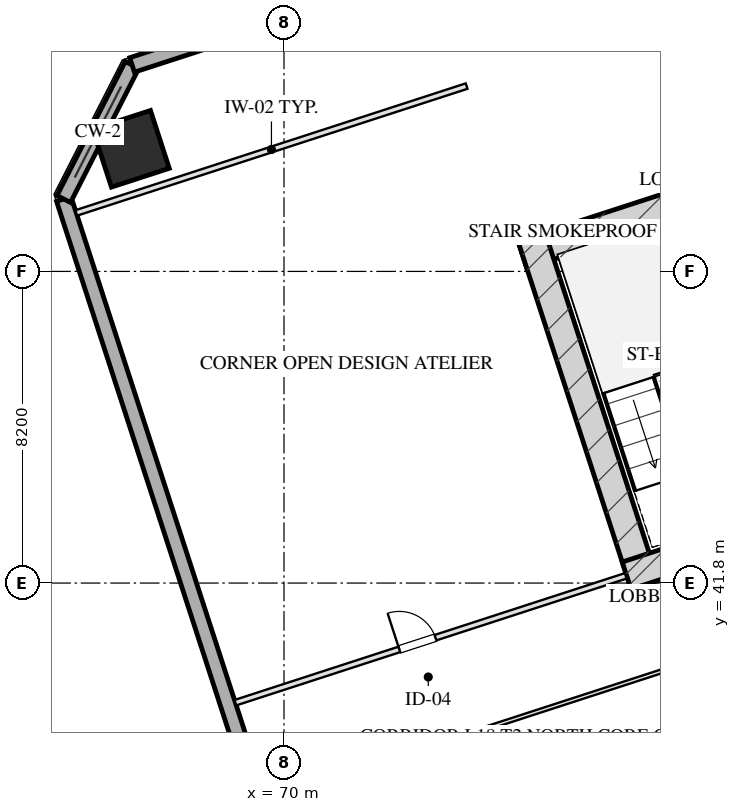
"""IFC4 building model, lengths in metres.
Left out: names, types, materials, properties, quantities, classifications, styles, units other than length and angle.
Written with IfcOpenShell. Run it as: python <this file> out.ifc"""

import sys

from ifc_helpers import new_model, si_unit, direction, frame, frame_2d, origin, origin_2d, place, context, subcontext, project, spatial, rectangle, hollow_rectangle, extrude, element, fill, save


model = new_model("IFC4")
c1 = context("Model", 3, precision=1e-05, world=origin(), true_north=direction((0.0, 1.0)))
c2 = subcontext(c1, "Body", "Model", "MODEL_VIEW")
j1 = project(units=[si_unit("LENGTHUNIT", "METRE"), si_unit("PLANEANGLEUNIT", "RADIAN")], contexts=[c1])
p1 = place(None, origin())
s1 = spatial("IfcSite", under=j1, at=p1, CompositionType="ELEMENT")
p2 = place(p1, origin())
s2 = spatial("IfcBuilding", under=s1, at=p2, CompositionType="ELEMENT")
p3 = place(p2, frame((0.0, 0.0, 74.75)))
s3 = spatial("IfcBuildingStorey", under=s2, at=p3, CompositionType="ELEMENT", Elevation=74.75)
p4 = place(p3, frame((76.272, 50.443, 0.0), z_axis=(0.0, 0.0, 1.0), x_axis=(0.951056072937, 0.309018358888, 0.0)))
e1 = element("IfcWall", 1, at=p4, inside=s3, PredefinedType="SHEAR", context=c2, shape_type="SweptSolid", body=[
    extrude(rectangle(XDim=16.55, YDim=0.75, at=frame_2d((8.275, 0.0))), origin(), (0.0, 0.0, 1.0), 3.45),
])
p5 = place(p3, frame((79.489, 41.756, 0.0), z_axis=(0.0, 0.0, 1.0), x_axis=(-0.309016134813, 0.951056795583, 0.0)))
e2 = element("IfcWall", 2, at=p5, inside=s3, PredefinedType="SHEAR", context=c2, shape_type="SweptSolid", body=[
    extrude(rectangle(XDim=9.63, YDim=0.75, at=frame_2d((4.815, 0.0))), origin(), (0.0, 0.0, 1.0), 3.45),
])
p6 = place(p3, frame((79.016, 41.997, 0.0), z_axis=(0.0, 0.0, 1.0), x_axis=(0.95106038264, 0.309005094736, 0.0)))
e3 = element("IfcWall", 3, at=p6, inside=s3, PredefinedType="SHEAR", context=c2, shape_type="SweptSolid", body=[
    extrude(rectangle(XDim=4.295, YDim=0.75, at=frame_2d((2.147, 0.0))), origin(), (0.0, 0.0, 1.0), 3.45),
])
p7 = place(p3, frame((65.973, 53.226, 0.0), z_axis=(0.0, 0.0, 1.0), x_axis=(0.951056516295, 0.309016994375, 0.0)))
e4 = element("IfcColumn", 4, at=p7, inside=s3, PredefinedType="COLUMN", context=c2, shape_type="SweptSolid", body=[
    extrude(hollow_rectangle(XDim=1.6, YDim=1.6, WallThickness=0.055, at=origin_2d()), origin(), (0.0, 0.0, 1.0), 3.451),
])
p8 = place(p3, frame((79.655, 4.352, 0.0), z_axis=(0.0, 0.0, 1.0), x_axis=(-0.309014526607, 0.951057318118, 0.0)))
e5 = element("IfcWall", 5, at=p8, inside=s3, PredefinedType="SOLIDWALL", context=c2, shape_type="SweptSolid", body=[
    extrude(rectangle(XDim=50.0, YDim=0.4, at=frame_2d((25.0, 0.0))), origin(), (0.0, 0.0, 1.0), 2.61),
])
p9 = place(p8, frame((17.35, 0.0, 0.75)))
e6 = element("IfcOpeningElement", 6, at=p9, cuts=e5, PredefinedType="OPENING", context=c2, shape_type="SweptSolid", body=[
    extrude(rectangle(XDim=2.5, YDim=1.46, at=frame_2d((1.25, 0.73))), frame((0.0, 0.21, 0.0), z_axis=(0.0, -1.0, 0.0), x_axis=(1.0, 0.0, 0.0)), (0.0, 0.0, 1.0), 0.42),
])
p10 = place(p8, frame((21.15, 0.0, 0.75)))
e7 = element("IfcOpeningElement", 7, at=p10, cuts=e5, PredefinedType="OPENING", context=c2, shape_type="SweptSolid", body=[
    extrude(rectangle(XDim=2.5, YDim=1.46, at=frame_2d((1.25, 0.73))), frame((0.0, 0.21, 0.0), z_axis=(0.0, -1.0, 0.0), x_axis=(1.0, 0.0, 0.0)), (0.0, 0.0, 1.0), 0.42),
])
p11 = place(p8, frame((26.35, 0.0, 0.75)))
e8 = element("IfcOpeningElement", 8, at=p11, cuts=e5, PredefinedType="OPENING", context=c2, shape_type="SweptSolid", body=[
    extrude(rectangle(XDim=2.5, YDim=1.46, at=frame_2d((1.25, 0.73))), frame((0.0, 0.21, 0.0), z_axis=(0.0, -1.0, 0.0), x_axis=(1.0, 0.0, 0.0)), (0.0, 0.0, 1.0), 0.42),
])
p12 = place(p8, frame((30.15, 0.0, 0.75)))
e9 = element("IfcOpeningElement", 9, at=p12, cuts=e5, PredefinedType="OPENING", context=c2, shape_type="SweptSolid", body=[
    extrude(rectangle(XDim=2.5, YDim=1.46, at=frame_2d((1.25, 0.73))), frame((0.0, 0.21, 0.0), z_axis=(0.0, -1.0, 0.0), x_axis=(1.0, 0.0, 0.0)), (0.0, 0.0, 1.0), 0.42),
])
p13 = place(p3, frame((64.205, 51.905, 0.0), z_axis=(0.0, 0.0, 1.0), x_axis=(0.453958106755, 0.891023028497, 0.0)))
e10 = element("IfcWall", 10, at=p13, inside=s3, PredefinedType="SOLIDWALL", context=c2, shape_type="SweptSolid", body=[
    extrude(rectangle(XDim=3.96, YDim=0.4, at=frame_2d((1.98, 0.0))), origin(), (0.0, 0.0, 1.0), 2.61),
])
p14 = place(p3, frame((66.002, 55.433, 0.0), z_axis=(0.0, 0.0, 1.0), x_axis=(0.951055939317, 0.309018770125, 0.0)))
e11 = element("IfcWall", 11, at=p14, inside=s3, PredefinedType="SOLIDWALL", context=c2, shape_type="SweptSolid", body=[
    extrude(rectangle(XDim=32.4, YDim=0.4, at=frame_2d((16.2, 0.0))), origin(), (0.0, 0.0, 1.0), 2.61),
])
p15 = place(p3, frame((64.534, 51.539, 0.0), z_axis=(0.0, 0.0, 1.0), x_axis=(0.951056658866, 0.309016555588, 0.0)))
e12 = element("IfcWall", 12, at=p15, inside=s3, PredefinedType="PARTITIONING", context=c2, shape_type="SweptSolid", body=[
    extrude(rectangle(XDim=10.8, YDim=0.15, at=frame_2d((5.4, 0.0))), origin(), (0.0, 0.0, 1.0), 3.175),
])
p16 = place(p3, frame((68.721, 38.652, 0.0), z_axis=(0.0, 0.0, 1.0), x_axis=(0.951056658866, 0.309016555588, 0.0)))
e13 = element("IfcWall", 13, at=p16, inside=s3, PredefinedType="PARTITIONING", context=c2, shape_type="SweptSolid", body=[
    extrude(rectangle(XDim=10.8, YDim=0.15, at=frame_2d((5.4, 0.0))), origin(), (0.0, 0.0, 1.0), 2.15),
])
p17 = place(p16, frame((4.536, 0.0, 0.0)))
e14 = element("IfcOpeningElement", 14, at=p17, cuts=e13, PredefinedType="OPENING", context=c2, shape_type="SweptSolid", body=[
    extrude(rectangle(XDim=1.0, YDim=2.05, at=frame_2d((0.5, 1.025))), frame((0.0, 0.085, 0.0), z_axis=(0.0, -1.0, 0.0), x_axis=(1.0, 0.0, 0.0)), (0.0, 0.0, 1.0), 0.17),
])
p18 = place(p3, frame((69.549, 36.103, 0.0), z_axis=(0.0, 0.0, 1.0), x_axis=(0.951058077006, 0.309012190961, 0.0)))
e15 = element("IfcWall", 15, at=p18, inside=s3, PredefinedType="MOVABLE", context=c2, shape_type="SweptSolid", body=[
    extrude(rectangle(XDim=13.375, YDim=0.1, at=frame_2d((6.688, 0.0))), origin(), (0.0, 0.0, 1.0), 3.175),
])
p19 = place(p17, origin())
e16 = element("IfcDoor", 16, at=p19, inside=s3, OperationType="SINGLE_SWING_LEFT", PredefinedType="DOOR", context=c2, shape_type="SweptSolid", body=[
    extrude(rectangle(XDim=1.0, YDim=2.05, at=frame_2d((0.5, 1.025))), frame((0.0, 0.025, 0.0), z_axis=(0.0, -1.0, 0.0), x_axis=(1.0, 0.0, 0.0)), (0.0, 0.0, 1.0), 0.05),
])
fill(e14, e16)
save(model, sys.argv[1])
